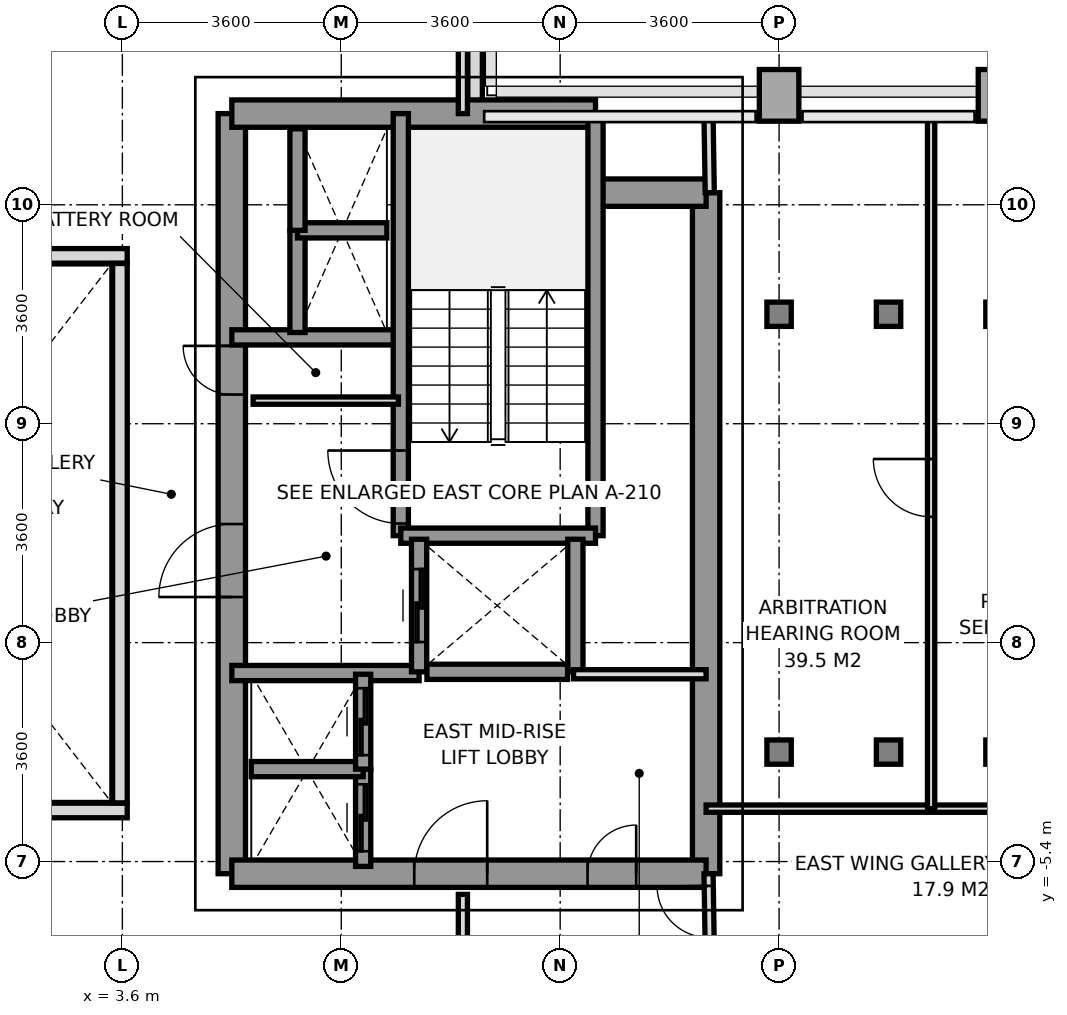
"""IFC4 building model, lengths in metres.
Left out: names, types, materials, properties, quantities, classifications, styles, units other than length and angle.
Written with IfcOpenShell. Run it as: python <this file> out.ifc"""

import sys

from ifc_helpers import new_model, si_unit, direction, frame, frame_2d, origin, origin_2d, place, context, subcontext, project, spatial, rectangle, i_section, extrude, source, transform, mapped, element, fill, save


model = new_model("IFC4")
c1 = context("Model", 3, precision=1e-05, world=origin(), true_north=direction((0.0, 1.0)))
c2 = subcontext(c1, "Body", "Model", "MODEL_VIEW")
j1 = project(units=[si_unit("LENGTHUNIT", "METRE"), si_unit("PLANEANGLEUNIT", "RADIAN")], contexts=[c1])
p1 = place(None, origin())
s1 = spatial("IfcSite", under=j1, at=p1, CompositionType="ELEMENT")
p2 = place(p1, origin())
s2 = spatial("IfcBuilding", under=s1, at=p2, CompositionType="ELEMENT")
p3 = place(p2, frame((0.0, 0.0, 134.6)))
s3 = spatial("IfcBuildingStorey", under=s2, at=p3, CompositionType="ELEMENT", Elevation=134.6)
m1 = source(origin(), c2, "Body", "SweptSolid", [
    extrude(i_section(OverallWidth=0.401, OverallDepth=0.399, WebThickness=0.02, FlangeThickness=0.032, at=origin_2d()), origin(), (0.0, 0.0, 1.0), 3.2),
])
for number, where, z_axis, x_axis in (
    (1, (14.4, -3.6, 0.0), (0.0, 0.0, 1.0), (1.0, 0.0, 0.0)),
    (2, (14.4, 3.6, 0.0), (0.0, 0.0, 1.0), (1.0, 0.0, 0.0)),
):
    element("IfcColumn", number, at=place(p3, frame(where, z_axis=z_axis, x_axis=x_axis)), inside=s3, PredefinedType="COLUMN", context=c2, shape_type="MappedRepresentation", body=[
        mapped(m1, transform((0.0, 0.0, 0.0), x_axis=(1.0, 0.0, 0.0), y_axis=(0.0, 1.0, 0.0), z_axis=(0.0, 0.0, 1.0), scale=1.0)),
    ])
m2 = source(origin(), c2, "Body", "SweptSolid", [
    extrude(rectangle(XDim=0.65, YDim=0.85, at=origin_2d()), origin(), (0.0, 0.0, 1.0), 3.2),
])
p4 = place(p3, frame((14.4, 7.2, 0.0), z_axis=(0.0, 0.0, 1.0), x_axis=(1.0, 0.0, 0.0)))
e3 = element("IfcColumn", 3, at=p4, inside=s3, PredefinedType="COLUMN", context=c2, shape_type="MappedRepresentation", body=[
    mapped(m2, transform((0.0, 0.0, 0.0), x_axis=(1.0, 0.0, 0.0), y_axis=(0.0, 1.0, 0.0), z_axis=(0.0, 0.0, 1.0), scale=1.0)),
])
for number, where, z_axis, x_axis in (
    (4, (16.2, -3.6, 0.0), (0.0, 0.0, 1.0), (1.0, 0.0, 0.0)),
    (5, (16.2, 3.6, 0.0), (0.0, 0.0, 1.0), (1.0, 0.0, 0.0)),
    (6, (18.0, -3.6, 0.0), (0.0, 0.0, 1.0), (1.0, 0.0, 0.0)),
    (7, (18.0, 3.6, 0.0), (0.0, 0.0, 1.0), (1.0, 0.0, 0.0)),
):
    element("IfcColumn", number, at=place(p3, frame(where, z_axis=z_axis, x_axis=x_axis)), inside=s3, PredefinedType="COLUMN", context=c2, shape_type="MappedRepresentation", body=[
        mapped(m1, transform((0.0, 0.0, 0.0), x_axis=(1.0, 0.0, 0.0), y_axis=(0.0, 1.0, 0.0), z_axis=(0.0, 0.0, 1.0), scale=1.0)),
    ])
p5 = place(p3, frame((18.0, 7.2, 0.0), z_axis=(0.0, 0.0, 1.0), x_axis=(1.0, 0.0, 0.0)))
e8 = element("IfcColumn", 8, at=p5, inside=s3, PredefinedType="COLUMN", context=c2, shape_type="MappedRepresentation", body=[
    mapped(m2, transform((0.0, 0.0, 0.0), x_axis=(1.0, 0.0, 0.0), y_axis=(0.0, 1.0, 0.0), z_axis=(0.0, 0.0, 1.0), scale=1.0)),
])
p6 = place(p3, frame((9.4, 8.472, 0.0), z_axis=(0.0, 0.0, 1.0), x_axis=(0.0, -1.0, 0.0)))
e9 = element("IfcWall", 9, at=p6, inside=s3, PredefinedType="PARAPET", context=c2, shape_type="SweptSolid", body=[
    extrude(rectangle(XDim=1.519, YDim=0.24, at=frame_2d((0.76, 0.0))), origin(), (0.0, 0.0, 1.0), 1.15),
])
p7 = place(p3, frame((13.2, -5.6, 0.0), z_axis=(0.0, 0.0, 1.0), x_axis=(0.0, 1.0, 0.0)))
e10 = element("IfcWall", 10, at=p7, inside=s3, PredefinedType="SHEAR", context=c2, shape_type="SweptSolid", body=[
    extrude(rectangle(XDim=11.2, YDim=0.45, at=frame_2d((5.6, 0.0))), origin(), (0.0, 0.0, 1.0), 3.2),
])
p8 = place(p3, frame((5.4, -5.6, 0.0), z_axis=(0.0, 0.0, 1.0), x_axis=(0.0, 1.0, 0.0)))
e11 = element("IfcWall", 11, at=p8, inside=s3, PredefinedType="SHEAR", context=c2, shape_type="SweptSolid", body=[
    extrude(rectangle(XDim=12.5, YDim=0.45, at=frame_2d((6.25, 0.0))), origin(), (0.0, 0.0, 1.0), 3.2),
])
p9 = place(p8, frame((4.55, 0.0, 0.0)))
e12 = element("IfcOpeningElement", 12, at=p9, cuts=e11, PredefinedType="OPENING", context=c2, shape_type="SweptSolid", body=[
    extrude(rectangle(XDim=1.2, YDim=2.2, at=frame_2d((0.6, 1.1))), frame((0.0, 0.235, 0.0), z_axis=(0.0, -1.0, 0.0), x_axis=(1.0, 0.0, 0.0)), (0.0, 0.0, 1.0), 0.47),
])
p10 = place(p8, frame((7.88, 0.0, 0.0)))
e13 = element("IfcOpeningElement", 13, at=p10, cuts=e11, PredefinedType="OPENING", context=c2, shape_type="SweptSolid", body=[
    extrude(rectangle(XDim=0.8, YDim=2.1, at=frame_2d((0.4, 1.05))), frame((0.0, 0.235, 0.0), z_axis=(0.0, -1.0, 0.0), x_axis=(1.0, 0.0, 0.0)), (0.0, 0.0, 1.0), 0.47),
])
p11 = place(p3, frame((5.4, 6.9, 0.0), z_axis=(0.0, 0.0, 1.0), x_axis=(1.0, 0.0, 0.0)))
e14 = element("IfcWall", 14, at=p11, inside=s3, PredefinedType="SHEAR", context=c2, shape_type="SweptSolid", body=[
    extrude(rectangle(XDim=5.981, YDim=0.45, at=frame_2d((2.991, 0.0))), origin(), (0.0, 0.0, 1.0), 3.2),
])
p12 = place(p3, frame((11.381, 5.6, 0.0), z_axis=(0.0, 0.0, 1.0), x_axis=(1.0, 0.0, 0.0)))
e15 = element("IfcWall", 15, at=p12, inside=s3, PredefinedType="SHEAR", context=c2, shape_type="SweptSolid", body=[
    extrude(rectangle(XDim=1.819, YDim=0.45, at=frame_2d((0.909, 0.0))), origin(), (0.0, 0.0, 1.0), 3.2),
])
p13 = place(p3, frame((5.4, -5.6, 0.0), z_axis=(0.0, 0.0, 1.0), x_axis=(1.0, 0.0, 0.0)))
e16 = element("IfcWall", 16, at=p13, inside=s3, PredefinedType="SHEAR", context=c2, shape_type="SweptSolid", body=[
    extrude(rectangle(XDim=7.8, YDim=0.45, at=frame_2d((3.9, 0.0))), origin(), (0.0, 0.0, 1.0), 3.2),
])
p14 = place(p13, frame((3.0, 0.0, 0.0)))
e17 = element("IfcOpeningElement", 17, at=p14, cuts=e16, PredefinedType="OPENING", context=c2, shape_type="SweptSolid", body=[
    extrude(rectangle(XDim=1.2, YDim=2.2, at=frame_2d((0.6, 1.1))), frame((0.0, 0.235, 0.0), z_axis=(0.0, -1.0, 0.0), x_axis=(1.0, 0.0, 0.0)), (0.0, 0.0, 1.0), 0.47),
])
p15 = place(p13, frame((5.85, 0.0, 0.0)))
e18 = element("IfcOpeningElement", 18, at=p15, cuts=e16, PredefinedType="OPENING", context=c2, shape_type="SweptSolid", body=[
    extrude(rectangle(XDim=0.8, YDim=2.1, at=frame_2d((0.4, 1.05))), frame((0.0, 0.235, 0.0), z_axis=(0.0, -1.0, 0.0), x_axis=(1.0, 0.0, 0.0)), (0.0, 0.0, 1.0), 0.47),
])
p16 = place(p3, frame((5.4, 3.22, 0.0), z_axis=(0.0, 0.0, 1.0), x_axis=(1.0, 0.0, 0.0)))
e19 = element("IfcWall", 19, at=p16, inside=s3, PredefinedType="SOLIDWALL", context=c2, shape_type="SweptSolid", body=[
    extrude(rectangle(XDim=2.78, YDim=0.25, at=frame_2d((1.39, 0.0))), origin(), (0.0, 0.0, 1.0), 3.2),
])
p17 = place(p3, frame((5.4, -2.3, 0.0), z_axis=(0.0, 0.0, 1.0), x_axis=(1.0, 0.0, 0.0)))
e20 = element("IfcWall", 20, at=p17, inside=s3, PredefinedType="SOLIDWALL", context=c2, shape_type="SweptSolid", body=[
    extrude(rectangle(XDim=3.08, YDim=0.25, at=frame_2d((1.54, 0.0))), origin(), (0.0, 0.0, 1.0), 3.2),
])
p18 = place(p3, frame((8.179, -0.041, 0.0), z_axis=(0.0, 0.0, 1.0), x_axis=(0.0, 1.0, 0.0)))
e21 = element("IfcWall", 21, at=p18, inside=s3, PredefinedType="SOLIDWALL", context=c2, shape_type="SweptSolid", body=[
    extrude(rectangle(XDim=6.941, YDim=0.25, at=frame_2d((3.47, 0.0))), origin(), (0.0, 0.0, 1.0), 3.2),
])
p19 = place(p18, frame((0.2, 0.0, 0.0)))
e22 = element("IfcOpeningElement", 22, at=p19, cuts=e21, PredefinedType="OPENING", context=c2, shape_type="SweptSolid", body=[
    extrude(rectangle(XDim=1.2, YDim=2.2, at=frame_2d((0.6, 1.1))), frame((0.0, 0.135, 0.0), z_axis=(0.0, -1.0, 0.0), x_axis=(1.0, 0.0, 0.0)), (0.0, 0.0, 1.0), 0.27),
])
p20 = place(p3, frame((11.381, -0.041, 0.0), z_axis=(0.0, 0.0, 1.0), x_axis=(0.0, 1.0, 0.0)))
e23 = element("IfcWall", 23, at=p20, inside=s3, PredefinedType="SOLIDWALL", context=c2, shape_type="SweptSolid", body=[
    extrude(rectangle(XDim=6.941, YDim=0.25, at=frame_2d((3.47, 0.0))), origin(), (0.0, 0.0, 1.0), 3.2),
])
p21 = place(p3, frame((8.179, -0.041, 0.0), z_axis=(0.0, 0.0, 1.0), x_axis=(1.0, 0.0, 0.0)))
e24 = element("IfcWall", 24, at=p21, inside=s3, PredefinedType="SOLIDWALL", context=c2, shape_type="SweptSolid", body=[
    extrude(rectangle(XDim=3.202, YDim=0.25, at=frame_2d((1.601, 0.0))), origin(), (0.0, 0.0, 1.0), 3.2),
])
p22 = place(p3, frame((8.48, -2.28, 0.0), z_axis=(0.0, 0.0, 1.0), x_axis=(0.0, 1.0, 0.0)))
e25 = element("IfcWall", 25, at=p22, inside=s3, PredefinedType="SOLIDWALL", context=c2, shape_type="SweptSolid", body=[
    extrude(rectangle(XDim=2.18, YDim=0.25, at=frame_2d((1.09, 0.0))), origin(), (0.0, 0.0, 1.0), 3.2),
])
p23 = place(p22, frame((0.49, 0.0, 0.0)))
e26 = element("IfcOpeningElement", 26, at=p23, cuts=e25, PredefinedType="OPENING", context=c2, shape_type="SweptSolid", body=[
    extrude(rectangle(XDim=1.2, YDim=2.2, at=frame_2d((0.6, 1.1))), frame((0.0, 0.135, 0.0), z_axis=(0.0, -1.0, 0.0), x_axis=(1.0, 0.0, 0.0)), (0.0, 0.0, 1.0), 0.27),
])
p24 = place(p3, frame((11.05, -2.28, 0.0), z_axis=(0.0, 0.0, 1.0), x_axis=(0.0, 1.0, 0.0)))
e27 = element("IfcWall", 27, at=p24, inside=s3, PredefinedType="SOLIDWALL", context=c2, shape_type="SweptSolid", body=[
    extrude(rectangle(XDim=2.18, YDim=0.25, at=frame_2d((1.09, 0.0))), origin(), (0.0, 0.0, 1.0), 3.2),
])
p25 = place(p3, frame((8.609, -2.28, 0.0), z_axis=(0.0, 0.0, 1.0), x_axis=(1.0, 0.0, 0.0)))
e28 = element("IfcWall", 28, at=p25, inside=s3, PredefinedType="SOLIDWALL", context=c2, shape_type="SweptSolid", body=[
    extrude(rectangle(XDim=2.312, YDim=0.25, at=frame_2d((1.156, 0.0))), origin(), (0.0, 0.0, 1.0), 3.2),
])
p26 = place(p3, frame((7.56, -5.48, 0.0), z_axis=(0.0, 0.0, 1.0), x_axis=(0.0, 1.0, 0.0)))
e29 = element("IfcWall", 29, at=p26, inside=s3, PredefinedType="SOLIDWALL", context=c2, shape_type="SweptSolid", body=[
    extrude(rectangle(XDim=1.6, YDim=0.25, at=frame_2d((0.8, 0.0))), origin(), (0.0, 0.0, 1.0), 3.2),
])
p27 = place(p26, frame((0.25, 0.0, 0.0)))
e30 = element("IfcOpeningElement", 30, at=p27, cuts=e29, PredefinedType="OPENING", context=c2, shape_type="SweptSolid", body=[
    extrude(rectangle(XDim=1.1, YDim=2.2, at=frame_2d((0.55, 1.1))), frame((0.0, 0.135, 0.0), z_axis=(0.0, -1.0, 0.0), x_axis=(1.0, 0.0, 0.0)), (0.0, 0.0, 1.0), 0.27),
])
p28 = place(p3, frame((5.72, -3.88, 0.0), z_axis=(0.0, 0.0, 1.0), x_axis=(1.0, 0.0, 0.0)))
e31 = element("IfcWall", 31, at=p28, inside=s3, PredefinedType="SOLIDWALL", context=c2, shape_type="SweptSolid", body=[
    extrude(rectangle(XDim=1.84, YDim=0.25, at=frame_2d((0.92, 0.0))), origin(), (0.0, 0.0, 1.0), 3.2),
])
p29 = place(p3, frame((7.56, -3.88, 0.0), z_axis=(0.0, 0.0, 1.0), x_axis=(0.0, 1.0, 0.0)))
e32 = element("IfcWall", 32, at=p29, inside=s3, PredefinedType="SOLIDWALL", context=c2, shape_type="SweptSolid", body=[
    extrude(rectangle(XDim=1.56, YDim=0.25, at=frame_2d((0.78, 0.0))), origin(), (0.0, 0.0, 1.0), 3.2),
])
p30 = place(p29, frame((0.23, 0.0, 0.0)))
e33 = element("IfcOpeningElement", 33, at=p30, cuts=e32, PredefinedType="OPENING", context=c2, shape_type="SweptSolid", body=[
    extrude(rectangle(XDim=1.1, YDim=2.2, at=frame_2d((0.55, 1.1))), frame((0.0, 0.135, 0.0), z_axis=(0.0, -1.0, 0.0), x_axis=(1.0, 0.0, 0.0)), (0.0, 0.0, 1.0), 0.27),
])
p31 = place(p3, frame((6.48, 3.3, 0.0), z_axis=(0.0, 0.0, 1.0), x_axis=(0.0, 1.0, 0.0)))
e34 = element("IfcWall", 34, at=p31, inside=s3, PredefinedType="SOLIDWALL", context=c2, shape_type="SweptSolid", body=[
    extrude(rectangle(XDim=1.68, YDim=0.25, at=frame_2d((0.84, 0.0))), origin(), (0.0, 0.0, 1.0), 3.2),
])
p32 = place(p3, frame((6.48, 4.98, 0.0), z_axis=(0.0, 0.0, 1.0), x_axis=(1.0, 0.0, 0.0)))
e35 = element("IfcWall", 35, at=p32, inside=s3, PredefinedType="SOLIDWALL", context=c2, shape_type="SweptSolid", body=[
    extrude(rectangle(XDim=1.47, YDim=0.25, at=frame_2d((0.735, 0.0))), origin(), (0.0, 0.0, 1.0), 3.2),
])
p33 = place(p3, frame((6.48, 4.98, 0.0), z_axis=(0.0, 0.0, 1.0), x_axis=(0.0, 1.0, 0.0)))
e36 = element("IfcWall", 36, at=p33, inside=s3, PredefinedType="SOLIDWALL", context=c2, shape_type="SweptSolid", body=[
    extrude(rectangle(XDim=1.67, YDim=0.25, at=frame_2d((0.835, 0.0))), origin(), (0.0, 0.0, 1.0), 3.2),
])
p34 = place(p3, frame((5.75, 2.18, 0.0), z_axis=(0.0, 0.0, 1.0), x_axis=(1.0, 0.0, 0.0)))
e37 = element("IfcWall", 37, at=p34, inside=s3, PredefinedType="PARTITIONING", context=c2, shape_type="SweptSolid", body=[
    extrude(rectangle(XDim=2.39, YDim=0.12, at=frame_2d((1.195, 0.0))), origin(), (0.0, 0.0, 1.0), 2.3),
])
p35 = place(p3, frame((11.02, -2.32, 0.0), z_axis=(0.0, 0.0, 1.0), x_axis=(1.0, 0.0, 0.0)))
e38 = element("IfcWall", 38, at=p35, inside=s3, PredefinedType="PARTITIONING", context=c2, shape_type="SweptSolid", body=[
    extrude(rectangle(XDim=2.18, YDim=0.15, at=frame_2d((1.09, 0.0))), origin(), (0.0, 0.0, 1.0), 3.2),
])
p36 = place(p3, frame((9.2, 6.9, 0.0), z_axis=(0.0, 0.0, 1.0), x_axis=(0.0, 1.0, 0.0)))
e39 = element("IfcWall", 39, at=p36, inside=s3, PredefinedType="PARTITIONING", context=c2, shape_type="SweptSolid", body=[
    extrude(rectangle(XDim=8.78, YDim=0.15, at=frame_2d((4.39, 0.0))), origin(), (0.0, 0.0, 1.0), 2.7),
])
p37 = place(p3, frame((9.2, -15.68, 0.0), z_axis=(0.0, 0.0, 1.0), x_axis=(0.0, 1.0, 0.0)))
e40 = element("IfcWall", 40, at=p37, inside=s3, PredefinedType="PARTITIONING", context=c2, shape_type="SweptSolid", body=[
    extrude(rectangle(XDim=9.74, YDim=0.15, at=frame_2d((4.87, 0.0))), origin(), (0.0, 0.0, 1.0), 2.7),
])
p38 = place(p3, frame((13.26, 5.6, 0.0), z_axis=(0.0, 0.0, 1.0), x_axis=(-0.016013571389, 0.999871774545, 0.0)))
e41 = element("IfcWall", 41, at=p38, inside=s3, PredefinedType="PARTITIONING", context=c2, shape_type="SweptSolid", body=[
    extrude(rectangle(XDim=1.25, YDim=0.15, at=frame_2d((0.625, 0.0))), origin(), (0.0, 0.0, 1.0), 3.2),
])
p39 = place(p3, frame((13.26, -6.85, 0.0), z_axis=(0.0, 0.0, 1.0), x_axis=(-0.016013571389, 0.999871774545, 0.0)))
e42 = element("IfcWall", 42, at=p39, inside=s3, PredefinedType="PARTITIONING", context=c2, shape_type="SweptSolid", body=[
    extrude(rectangle(XDim=1.25, YDim=0.15, at=frame_2d((0.625, 0.0))), origin(), (0.0, 0.0, 1.0), 3.2),
])
p40 = place(p39, frame((0.2, 0.0, 0.0)))
e43 = element("IfcOpeningElement", 43, at=p40, cuts=e42, PredefinedType="OPENING", context=c2, shape_type="SweptSolid", body=[
    extrude(rectangle(XDim=0.85, YDim=2.1, at=frame_2d((0.425, 1.05))), frame((0.0, 0.085, 0.0), z_axis=(0.0, -1.0, 0.0), x_axis=(1.0, 0.0, 0.0)), (0.0, 0.0, 1.0), 0.17),
])
p41 = place(p3, frame((13.2, -4.53, 0.0), z_axis=(0.0, 0.0, 1.0), x_axis=(1.0, 0.0, 0.0)))
e44 = element("IfcWall", 44, at=p41, inside=s3, PredefinedType="PARTITIONING", context=c2, shape_type="SweptSolid", body=[
    extrude(rectangle(XDim=10.1, YDim=0.12, at=frame_2d((5.05, 0.0))), origin(), (0.0, 0.0, 1.0), 2.75),
])
p42 = place(p41, frame((7.75, 0.0, 0.0)))
e45 = element("IfcOpeningElement", 45, at=p42, cuts=e44, PredefinedType="OPENING", context=c2, shape_type="SweptSolid", body=[
    extrude(rectangle(XDim=0.95, YDim=2.15, at=frame_2d((0.475, 1.075))), frame((0.0, 0.07, 0.0), z_axis=(0.0, -1.0, 0.0), x_axis=(1.0, 0.0, 0.0)), (0.0, 0.0, 1.0), 0.14),
])
p43 = place(p3, frame((16.9, -4.53, 0.0), z_axis=(0.0, 0.0, 1.0), x_axis=(0.0, 1.0, 0.0)))
e46 = element("IfcWall", 46, at=p43, inside=s3, PredefinedType="PARTITIONING", context=c2, shape_type="SweptSolid", body=[
    extrude(rectangle(XDim=11.38, YDim=0.12, at=frame_2d((5.69, 0.0))), origin(), (0.0, 0.0, 1.0), 2.7),
])
p44 = place(p43, frame((4.8, 0.0, 0.0)))
e47 = element("IfcOpeningElement", 47, at=p44, cuts=e46, PredefinedType="OPENING", context=c2, shape_type="SweptSolid", body=[
    extrude(rectangle(XDim=0.95, YDim=2.15, at=frame_2d((0.475, 1.075))), frame((0.0, 0.07, 0.0), z_axis=(0.0, -1.0, 0.0), x_axis=(1.0, 0.0, 0.0)), (0.0, 0.0, 1.0), 0.14),
])
for number, where, z_axis, x_axis in (
    (48, (-3.68, -4.56, 0.0), (0.0, 0.0, 1.0), (1.0, 0.0, 0.0)),
    (49, (-3.68, 4.56, 0.0), (0.0, 0.0, 1.0), (1.0, 0.0, 0.0)),
):
    element("IfcWall", number, at=place(p3, frame(where, z_axis=z_axis, x_axis=x_axis)), inside=s3, PredefinedType="PARAPET", context=c2, shape_type="SweptSolid", body=[
        extrude(rectangle(XDim=7.36, YDim=0.24, at=frame_2d((3.68, 0.0))), origin(), (0.0, 0.0, 1.0), 1.15),
    ])
p45 = place(p3, frame((3.56, -4.435, 0.0), z_axis=(0.0, 0.0, 1.0), x_axis=(0.0, 1.0, 0.0)))
e50 = element("IfcWall", 50, at=p45, inside=s3, PredefinedType="PARAPET", context=c2, shape_type="SweptSolid", body=[
    extrude(rectangle(XDim=8.87, YDim=0.24, at=frame_2d((4.435, 0.0))), origin(), (0.0, 0.0, 1.0), 1.15),
])
m3 = source(origin(), c2, "Body", "SweptSolid", [
    extrude(rectangle(XDim=1.2, YDim=2.2, at=frame_2d((0.6, 1.1))), frame((0.0, 0.025, 0.0), z_axis=(0.0, -1.0, 0.0), x_axis=(1.0, 0.0, 0.0)), (0.0, 0.0, 1.0), 0.05),
])
p46 = place(p19, origin())
e51 = element("IfcDoor", 51, at=p46, inside=s3, OperationType="SINGLE_SWING_RIGHT", PredefinedType="DOOR", context=c2, shape_type="MappedRepresentation", body=[
    mapped(m3, transform((0.0, 0.0, 0.0), x_axis=(1.0, 0.0, 0.0), y_axis=(0.0, 1.0, 0.0), z_axis=(0.0, 0.0, 1.0), scale=1.0)),
])
fill(e22, e51)
p47 = place(p9, origin())
e52 = element("IfcDoor", 52, at=p47, inside=s3, OperationType="SINGLE_SWING_LEFT", PredefinedType="DOOR", context=c2, shape_type="MappedRepresentation", body=[
    mapped(m3, transform((0.0, 0.0, 0.0), x_axis=(1.0, 0.0, 0.0), y_axis=(0.0, 1.0, 0.0), z_axis=(0.0, 0.0, 1.0), scale=1.0)),
])
fill(e12, e52)
p48 = place(p14, origin())
e53 = element("IfcDoor", 53, at=p48, inside=s3, OperationType="SINGLE_SWING_RIGHT", PredefinedType="DOOR", context=c2, shape_type="MappedRepresentation", body=[
    mapped(m3, transform((0.0, 0.0, 0.0), x_axis=(1.0, 0.0, 0.0), y_axis=(0.0, 1.0, 0.0), z_axis=(0.0, 0.0, 1.0), scale=1.0)),
])
fill(e17, e53)
m4 = source(origin(), c2, "Body", "SweptSolid", [
    extrude(rectangle(XDim=0.8, YDim=2.1, at=frame_2d((0.4, 1.05))), frame((0.0, 0.025, 0.0), z_axis=(0.0, -1.0, 0.0), x_axis=(1.0, 0.0, 0.0)), (0.0, 0.0, 1.0), 0.05),
])
p49 = place(p10, origin())
e54 = element("IfcDoor", 54, at=p49, inside=s3, OperationType="SINGLE_SWING_RIGHT", PredefinedType="DOOR", context=c2, shape_type="MappedRepresentation", body=[
    mapped(m4, transform((0.0, 0.0, 0.0), x_axis=(1.0, 0.0, 0.0), y_axis=(0.0, 1.0, 0.0), z_axis=(0.0, 0.0, 1.0), scale=1.0)),
])
fill(e13, e54)
p50 = place(p15, origin())
e55 = element("IfcDoor", 55, at=p50, inside=s3, OperationType="SINGLE_SWING_RIGHT", PredefinedType="DOOR", context=c2, shape_type="MappedRepresentation", body=[
    mapped(m4, transform((0.0, 0.0, 0.0), x_axis=(1.0, 0.0, 0.0), y_axis=(0.0, 1.0, 0.0), z_axis=(0.0, 0.0, 1.0), scale=1.0)),
])
fill(e18, e55)
p51 = place(p23, origin())
e56 = element("IfcDoor", 56, at=p51, inside=s3, OperationType="SLIDING_TO_RIGHT", PredefinedType="DOOR", context=c2, shape_type="MappedRepresentation", body=[
    mapped(m3, transform((0.0, 0.0, 0.0), x_axis=(1.0, 0.0, 0.0), y_axis=(0.0, 1.0, 0.0), z_axis=(0.0, 0.0, 1.0), scale=1.0)),
])
fill(e26, e56)
m5 = source(origin(), c2, "Body", "SweptSolid", [
    extrude(rectangle(XDim=1.1, YDim=2.2, at=frame_2d((0.55, 1.1))), frame((0.0, 0.025, 0.0), z_axis=(0.0, -1.0, 0.0), x_axis=(1.0, 0.0, 0.0)), (0.0, 0.0, 1.0), 0.05),
])
p52 = place(p27, origin())
e57 = element("IfcDoor", 57, at=p52, inside=s3, OperationType="SLIDING_TO_LEFT", PredefinedType="DOOR", context=c2, shape_type="MappedRepresentation", body=[
    mapped(m5, transform((0.0, 0.0, 0.0), x_axis=(1.0, 0.0, 0.0), y_axis=(0.0, 1.0, 0.0), z_axis=(0.0, 0.0, 1.0), scale=1.0)),
])
fill(e30, e57)
p53 = place(p30, origin())
e58 = element("IfcDoor", 58, at=p53, inside=s3, OperationType="SLIDING_TO_LEFT", PredefinedType="DOOR", context=c2, shape_type="MappedRepresentation", body=[
    mapped(m5, transform((0.0, 0.0, 0.0), x_axis=(1.0, 0.0, 0.0), y_axis=(0.0, 1.0, 0.0), z_axis=(0.0, 0.0, 1.0), scale=1.0)),
])
fill(e33, e58)
m6 = source(origin(), c2, "Body", "SweptSolid", [
    extrude(rectangle(XDim=0.85, YDim=2.1, at=frame_2d((0.425, 1.05))), frame((0.0, 0.025, 0.0), z_axis=(0.0, -1.0, 0.0), x_axis=(1.0, 0.0, 0.0)), (0.0, 0.0, 1.0), 0.05),
])
p54 = place(p40, origin())
e59 = element("IfcDoor", 59, at=p54, inside=s3, OperationType="SINGLE_SWING_RIGHT", PredefinedType="DOOR", context=c2, shape_type="MappedRepresentation", body=[
    mapped(m6, transform((0.0, 0.0, 0.0), x_axis=(1.0, 0.0, 0.0), y_axis=(0.0, 1.0, 0.0), z_axis=(0.0, 0.0, 1.0), scale=1.0)),
])
fill(e43, e59)
m7 = source(origin(), c2, "Body", "SweptSolid", [
    extrude(rectangle(XDim=0.95, YDim=2.15, at=frame_2d((0.475, 1.075))), frame((0.0, 0.025, 0.0), z_axis=(0.0, -1.0, 0.0), x_axis=(1.0, 0.0, 0.0)), (0.0, 0.0, 1.0), 0.05),
])
p55 = place(p44, origin())
e60 = element("IfcDoor", 60, at=p55, inside=s3, OperationType="SINGLE_SWING_RIGHT", PredefinedType="DOOR", context=c2, shape_type="MappedRepresentation", body=[
    mapped(m7, transform((0.0, 0.0, 0.0), x_axis=(1.0, 0.0, 0.0), y_axis=(0.0, 1.0, 0.0), z_axis=(0.0, 0.0, 1.0), scale=1.0)),
])
fill(e47, e60)
save(model, sys.argv[1])
